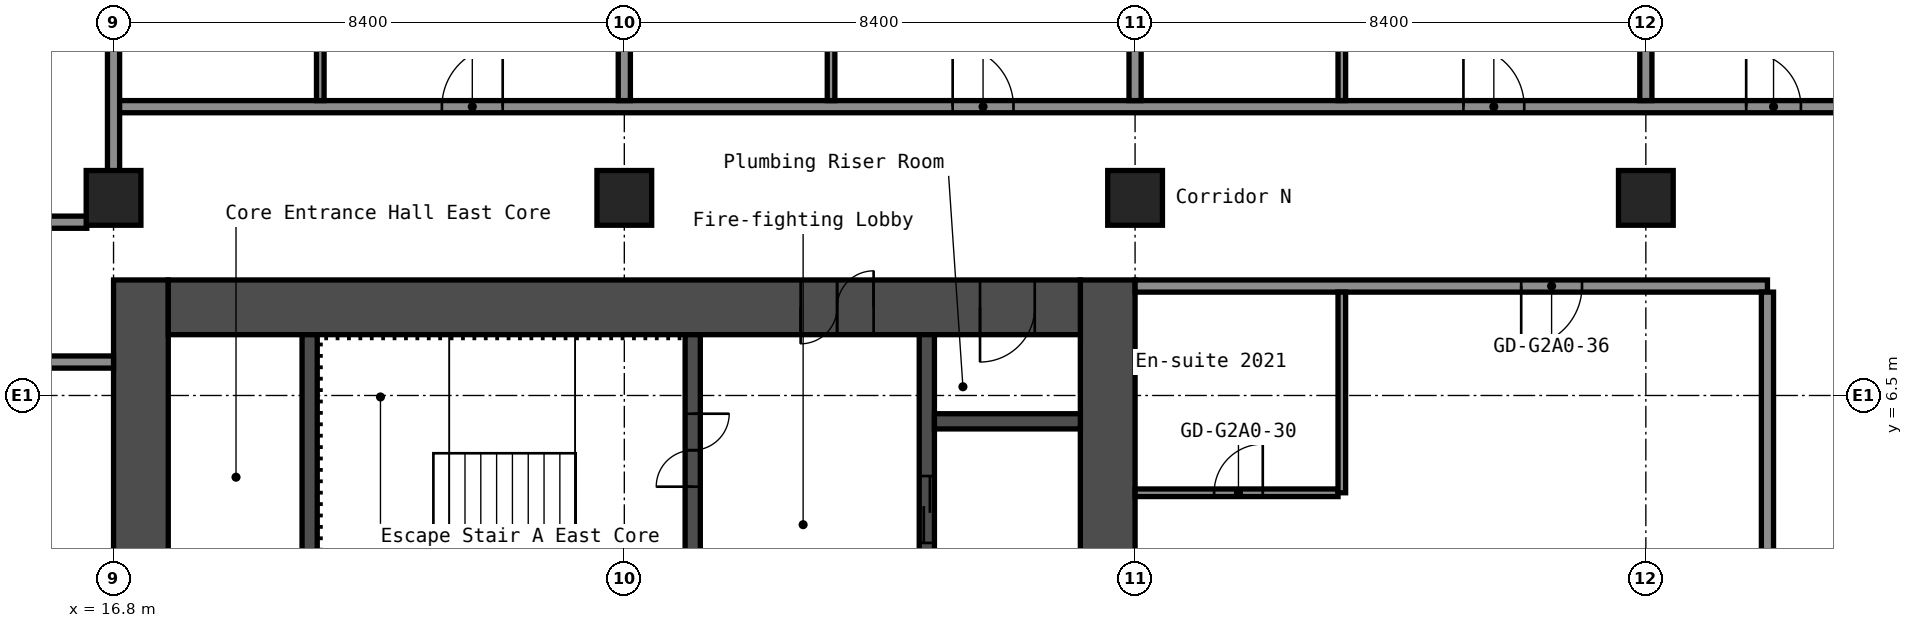
"""IFC4 building model, lengths in metres.
Left out: names, types, materials, properties, quantities, classifications, styles, units other than length and angle.
Written with IfcOpenShell. Run it as: python <this file> out.ifc"""

import sys

from ifc_helpers import new_model, si_unit, direction, frame, frame_2d, origin, origin_2d, place, context, subcontext, project, spatial, rectangle, hollow_rectangle, extrude, element, fill, save


model = new_model("IFC4")
c1 = context("Model", 3, precision=1e-05, world=origin(), true_north=direction((0.0, 1.0)))
c2 = subcontext(c1, "Body", "Model", "MODEL_VIEW")
j1 = project(units=[si_unit("LENGTHUNIT", "METRE"), si_unit("PLANEANGLEUNIT", "RADIAN")], contexts=[c1])
p1 = place(None, origin())
s1 = spatial("IfcSite", under=j1, at=p1, CompositionType="ELEMENT")
p2 = place(p1, origin())
s2 = spatial("IfcBuilding", under=s1, at=p2, CompositionType="ELEMENT")
p3 = place(p2, frame((0.0, 0.0, 75.4)))
s3 = spatial("IfcBuildingStorey", under=s2, at=p3, CompositionType="ELEMENT", Elevation=75.4)
for number, where, z_axis, x_axis in (
    (1, (16.8, 9.75, 0.0), (0.0, 0.0, 1.0), (1.0, 0.0, 0.0)),
    (2, (25.2, 9.75, 0.0), (0.0, 0.0, 1.0), (1.0, 0.0, 0.0)),
    (3, (33.6, 9.75, 0.0), (0.0, 0.0, 1.0), (1.0, 0.0, 0.0)),
    (4, (42.0, 9.75, 0.0), (0.0, 0.0, 1.0), (1.0, 0.0, 0.0)),
):
    element("IfcColumn", number, at=place(p3, frame(where, z_axis=z_axis, x_axis=x_axis)), inside=s3, PredefinedType="COLUMN", context=c2, shape_type="SweptSolid", body=[
        extrude(hollow_rectangle(XDim=0.9, YDim=0.9, WallThickness=0.036, at=origin_2d()), origin(), (0.0, 0.0, 1.0), 2.8),
    ])
p4 = place(p3, frame((17.25, -8.4, 0.0), z_axis=(0.0, 0.0, 1.0), x_axis=(0.0, 1.0, 0.0)))
e5 = element("IfcWall", 5, at=p4, inside=s3, PredefinedType="SHEAR", context=c2, shape_type="SweptSolid", body=[
    extrude(rectangle(XDim=16.8, YDim=0.9, at=frame_2d((8.4, 0.0))), origin(), (0.0, 0.0, 1.0), 2.8),
])
p5 = place(p4, frame((7.6, 0.0, 0.0)))
e6 = element("IfcOpeningElement", 6, at=p5, cuts=e5, PredefinedType="OPENING", context=c2, shape_type="SweptSolid", body=[
    extrude(rectangle(XDim=1.2, YDim=2.1, at=frame_2d((0.6, 1.05))), frame((0.0, 0.46, 0.0), z_axis=(0.0, -1.0, 0.0), x_axis=(1.0, 0.0, 0.0)), (0.0, 0.0, 1.0), 0.92),
])
p6 = place(p3, frame((33.15, -8.4, 0.0), z_axis=(0.0, 0.0, 1.0), x_axis=(0.0, 1.0, 0.0)))
e7 = element("IfcWall", 7, at=p6, inside=s3, PredefinedType="SHEAR", context=c2, shape_type="SweptSolid", body=[
    extrude(rectangle(XDim=16.8, YDim=0.9, at=frame_2d((8.4, 0.0))), origin(), (0.0, 0.0, 1.0), 2.8),
])
p7 = place(p3, frame((17.7, 7.95, 0.0), z_axis=(0.0, 0.0, 1.0), x_axis=(1.0, 0.0, 0.0)))
e8 = element("IfcWall", 8, at=p7, inside=s3, PredefinedType="SHEAR", context=c2, shape_type="SweptSolid", body=[
    extrude(rectangle(XDim=15.0, YDim=0.9, at=frame_2d((7.5, 0.0))), origin(), (0.0, 0.0, 1.0), 2.8),
])
p8 = place(p7, frame((10.4, 0.0, 0.0)))
e9 = element("IfcOpeningElement", 9, at=p8, cuts=e8, PredefinedType="OPENING", context=c2, shape_type="SweptSolid", body=[
    extrude(rectangle(XDim=1.2, YDim=2.1, at=frame_2d((0.6, 1.05))), frame((0.0, 0.46, 0.0), z_axis=(0.0, -1.0, 0.0), x_axis=(1.0, 0.0, 0.0)), (0.0, 0.0, 1.0), 0.92),
])
p9 = place(p7, frame((13.35, 0.0, 0.0)))
e10 = element("IfcOpeningElement", 10, at=p9, cuts=e8, PredefinedType="OPENING", context=c2, shape_type="SweptSolid", body=[
    extrude(rectangle(XDim=0.9, YDim=2.1, at=frame_2d((0.45, 1.05))), frame((0.0, 0.46, 0.0), z_axis=(0.0, -1.0, 0.0), x_axis=(1.0, 0.0, 0.0)), (0.0, 0.0, 1.0), 0.92),
])
p10 = place(p3, frame((20.025, 1.2, 0.0), z_axis=(0.0, 0.0, 1.0), x_axis=(0.0, 1.0, 0.0)))
e11 = element("IfcWall", 11, at=p10, inside=s3, PredefinedType="SHEAR", context=c2, shape_type="SweptSolid", body=[
    extrude(rectangle(XDim=6.3, YDim=0.25, at=frame_2d((3.15, 0.0))), origin(), (0.0, 0.0, 1.0), 2.8),
])
p11 = place(p3, frame((26.325, 3.75, 0.0), z_axis=(0.0, 0.0, 1.0), x_axis=(0.0, 1.0, 0.0)))
e12 = element("IfcWall", 12, at=p11, inside=s3, PredefinedType="SHEAR", context=c2, shape_type="SweptSolid", body=[
    extrude(rectangle(XDim=3.75, YDim=0.25, at=frame_2d((1.875, 0.0))), origin(), (0.0, 0.0, 1.0), 2.8),
])
p12 = place(p11, frame((1.25, 0.0, 0.0)))
e13 = element("IfcOpeningElement", 13, at=p12, cuts=e12, PredefinedType="OPENING", context=c2, shape_type="SweptSolid", body=[
    extrude(rectangle(XDim=1.2, YDim=2.1, at=frame_2d((0.6, 1.05))), frame((0.0, 0.135, 0.0), z_axis=(0.0, -1.0, 0.0), x_axis=(1.0, 0.0, 0.0)), (0.0, 0.0, 1.0), 0.27),
])
p13 = place(p3, frame((30.175, 1.45, 0.0), z_axis=(0.0, 0.0, 1.0), x_axis=(0.0, 1.0, 0.0)))
e14 = element("IfcWall", 14, at=p13, inside=s3, PredefinedType="SHEAR", context=c2, shape_type="SweptSolid", body=[
    extrude(rectangle(XDim=6.05, YDim=0.25, at=frame_2d((3.025, 0.0))), origin(), (0.0, 0.0, 1.0), 2.8),
])
p14 = place(p13, frame((2.625, 0.0, 0.0)))
e15 = element("IfcOpeningElement", 15, at=p14, cuts=e14, PredefinedType="OPENING", context=c2, shape_type="SweptSolid", body=[
    extrude(rectangle(XDim=1.1, YDim=2.1, at=frame_2d((0.55, 1.05))), frame((0.0, 0.135, 0.0), z_axis=(0.0, -1.0, 0.0), x_axis=(1.0, 0.0, 0.0)), (0.0, 0.0, 1.0), 0.27),
])
p15 = place(p3, frame((30.3, 6.075, 0.0), z_axis=(0.0, 0.0, 1.0), x_axis=(1.0, 0.0, 0.0)))
e16 = element("IfcWall", 16, at=p15, inside=s3, PredefinedType="SHEAR", context=c2, shape_type="SweptSolid", body=[
    extrude(rectangle(XDim=2.4, YDim=0.25, at=frame_2d((1.2, 0.0))), origin(), (0.0, 0.0, 1.0), 2.8),
])
p16 = place(p3, frame((33.6, 4.9, 0.0), z_axis=(0.0, 0.0, 1.0), x_axis=(1.0, 0.0, 0.0)))
e17 = element("IfcWall", 17, at=p16, inside=s3, PredefinedType="PARTITIONING", context=c2, shape_type="SweptSolid", body=[
    extrude(rectangle(XDim=3.337, YDim=0.125, at=frame_2d((1.669, 0.0))), origin(), (0.0, 0.0, 1.0), 2.8),
])
p17 = place(p16, frame((1.3, 0.0, 0.0)))
e18 = element("IfcOpeningElement", 18, at=p17, cuts=e17, PredefinedType="OPENING", context=c2, shape_type="SweptSolid", body=[
    extrude(rectangle(XDim=0.8, YDim=2.1, at=frame_2d((0.4, 1.05))), frame((0.0, 0.073, 0.0), z_axis=(0.0, -1.0, 0.0), x_axis=(1.0, 0.0, 0.0)), (0.0, 0.0, 1.0), 0.145),
])
p18 = place(p3, frame((-16.8, 7.05, 0.0), z_axis=(0.0, 0.0, 1.0), x_axis=(1.0, 0.0, 0.0)))
e19 = element("IfcWall", 19, at=p18, inside=s3, PredefinedType="PARTITIONING", context=c2, shape_type="SweptSolid", body=[
    extrude(rectangle(XDim=33.6, YDim=0.2, at=frame_2d((16.8, 0.0))), origin(), (0.0, 0.0, 1.0), 2.8),
])
p19 = place(p18, frame((2.155, 0.0, 0.0)))
e20 = element("IfcOpeningElement", 20, at=p19, cuts=e19, PredefinedType="OPENING", context=c2, shape_type="SweptSolid", body=[
    extrude(rectangle(XDim=0.9, YDim=2.1, at=frame_2d((0.45, 1.05))), frame((0.0, 0.11, 0.0), z_axis=(0.0, -1.0, 0.0), x_axis=(1.0, 0.0, 0.0)), (0.0, 0.0, 1.0), 0.22),
])
p20 = place(p18, frame((6.355, 0.0, 0.0)))
e21 = element("IfcOpeningElement", 21, at=p20, cuts=e19, PredefinedType="OPENING", context=c2, shape_type="SweptSolid", body=[
    extrude(rectangle(XDim=0.9, YDim=2.1, at=frame_2d((0.45, 1.05))), frame((0.0, 0.11, 0.0), z_axis=(0.0, -1.0, 0.0), x_axis=(1.0, 0.0, 0.0)), (0.0, 0.0, 1.0), 0.22),
])
p21 = place(p18, frame((18.28, 0.0, 0.0)))
e22 = element("IfcOpeningElement", 22, at=p21, cuts=e19, PredefinedType="OPENING", context=c2, shape_type="SweptSolid", body=[
    extrude(rectangle(XDim=0.9, YDim=2.1, at=frame_2d((0.45, 1.05))), frame((0.0, 0.11, 0.0), z_axis=(0.0, -1.0, 0.0), x_axis=(1.0, 0.0, 0.0)), (0.0, 0.0, 1.0), 0.22),
])
p22 = place(p18, frame((22.48, 0.0, 0.0)))
e23 = element("IfcOpeningElement", 23, at=p22, cuts=e19, PredefinedType="OPENING", context=c2, shape_type="SweptSolid", body=[
    extrude(rectangle(XDim=0.9, YDim=2.1, at=frame_2d((0.45, 1.05))), frame((0.0, 0.11, 0.0), z_axis=(0.0, -1.0, 0.0), x_axis=(1.0, 0.0, 0.0)), (0.0, 0.0, 1.0), 0.22),
])
p23 = place(p3, frame((33.6, 8.3, 0.0), z_axis=(0.0, 0.0, 1.0), x_axis=(1.0, 0.0, 0.0)))
e24 = element("IfcWall", 24, at=p23, inside=s3, PredefinedType="PARTITIONING", context=c2, shape_type="SweptSolid", body=[
    extrude(rectangle(XDim=10.4, YDim=0.2, at=frame_2d((5.2, 0.0))), origin(), (0.0, 0.0, 1.0), 2.8),
])
p24 = place(p23, frame((6.35, 0.0, 0.0)))
e25 = element("IfcOpeningElement", 25, at=p24, cuts=e24, PredefinedType="OPENING", context=c2, shape_type="SweptSolid", body=[
    extrude(rectangle(XDim=1.0, YDim=2.1, at=frame_2d((0.5, 1.05))), frame((0.0, 0.11, 0.0), z_axis=(0.0, -1.0, 0.0), x_axis=(1.0, 0.0, 0.0)), (0.0, 0.0, 1.0), 0.22),
])
p25 = place(p3, frame((-16.36, 9.35, 0.0), z_axis=(0.0, 0.0, 1.0), x_axis=(1.0, 0.0, 0.0)))
e26 = element("IfcWall", 26, at=p25, inside=s3, PredefinedType="PARTITIONING", context=c2, shape_type="SweptSolid", body=[
    extrude(rectangle(XDim=32.72, YDim=0.2, at=frame_2d((16.36, 0.0))), origin(), (0.0, 0.0, 1.0), 2.8),
])
p26 = place(p25, frame((1.545, 0.0, 0.0)))
e27 = element("IfcOpeningElement", 27, at=p26, cuts=e26, PredefinedType="OPENING", context=c2, shape_type="SweptSolid", body=[
    extrude(rectangle(XDim=0.9, YDim=2.1, at=frame_2d((0.45, 1.05))), frame((0.0, 0.11, 0.0), z_axis=(0.0, -1.0, 0.0), x_axis=(1.0, 0.0, 0.0)), (0.0, 0.0, 1.0), 0.22),
])
p27 = place(p25, frame((5.745, 0.0, 0.0)))
e28 = element("IfcOpeningElement", 28, at=p27, cuts=e26, PredefinedType="OPENING", context=c2, shape_type="SweptSolid", body=[
    extrude(rectangle(XDim=0.9, YDim=2.1, at=frame_2d((0.45, 1.05))), frame((0.0, 0.11, 0.0), z_axis=(0.0, -1.0, 0.0), x_axis=(1.0, 0.0, 0.0)), (0.0, 0.0, 1.0), 0.22),
])
p28 = place(p25, frame((9.275, 0.0, 0.0)))
e29 = element("IfcOpeningElement", 29, at=p28, cuts=e26, PredefinedType="OPENING", context=c2, shape_type="SweptSolid", body=[
    extrude(rectangle(XDim=0.9, YDim=2.1, at=frame_2d((0.45, 1.05))), frame((0.0, 0.11, 0.0), z_axis=(0.0, -1.0, 0.0), x_axis=(1.0, 0.0, 0.0)), (0.0, 0.0, 1.0), 0.22),
])
p29 = place(p25, frame((13.475, 0.0, 0.0)))
e30 = element("IfcOpeningElement", 30, at=p29, cuts=e26, PredefinedType="OPENING", context=c2, shape_type="SweptSolid", body=[
    extrude(rectangle(XDim=0.9, YDim=2.1, at=frame_2d((0.45, 1.05))), frame((0.0, 0.11, 0.0), z_axis=(0.0, -1.0, 0.0), x_axis=(1.0, 0.0, 0.0)), (0.0, 0.0, 1.0), 0.22),
])
p30 = place(p25, frame((17.76, 0.0, 0.0)))
e31 = element("IfcOpeningElement", 31, at=p30, cuts=e26, PredefinedType="OPENING", context=c2, shape_type="SweptSolid", body=[
    extrude(rectangle(XDim=0.9, YDim=2.1, at=frame_2d((0.45, 1.05))), frame((0.0, 0.11, 0.0), z_axis=(0.0, -1.0, 0.0), x_axis=(1.0, 0.0, 0.0)), (0.0, 0.0, 1.0), 0.22),
])
p31 = place(p25, frame((21.96, 0.0, 0.0)))
e32 = element("IfcOpeningElement", 32, at=p31, cuts=e26, PredefinedType="OPENING", context=c2, shape_type="SweptSolid", body=[
    extrude(rectangle(XDim=0.9, YDim=2.1, at=frame_2d((0.45, 1.05))), frame((0.0, 0.11, 0.0), z_axis=(0.0, -1.0, 0.0), x_axis=(1.0, 0.0, 0.0)), (0.0, 0.0, 1.0), 0.22),
])
p32 = place(p25, frame((28.46, 0.0, 0.0)))
e33 = element("IfcOpeningElement", 33, at=p32, cuts=e26, PredefinedType="OPENING", context=c2, shape_type="SweptSolid", body=[
    extrude(rectangle(XDim=1.0, YDim=2.1, at=frame_2d((0.5, 1.05))), frame((0.0, 0.11, 0.0), z_axis=(0.0, -1.0, 0.0), x_axis=(1.0, 0.0, 0.0)), (0.0, 0.0, 1.0), 0.22),
])
p33 = place(p3, frame((16.8, 11.25, 0.0), z_axis=(0.0, 0.0, 1.0), x_axis=(1.0, 0.0, 0.0)))
e34 = element("IfcWall", 34, at=p33, inside=s3, PredefinedType="PARTITIONING", context=c2, shape_type="SweptSolid", body=[
    extrude(rectangle(XDim=29.7, YDim=0.2, at=frame_2d((14.85, 0.0))), origin(), (0.0, 0.0, 1.0), 2.8),
])
p34 = place(p33, frame((5.4, 0.0, 0.0)))
e35 = element("IfcOpeningElement", 35, at=p34, cuts=e34, PredefinedType="OPENING", context=c2, shape_type="SweptSolid", body=[
    extrude(rectangle(XDim=1.0, YDim=2.1, at=frame_2d((0.5, 1.05))), frame((0.0, 0.11, 0.0), z_axis=(0.0, -1.0, 0.0), x_axis=(1.0, 0.0, 0.0)), (0.0, 0.0, 1.0), 0.22),
])
p35 = place(p33, frame((13.8, 0.0, 0.0)))
e36 = element("IfcOpeningElement", 36, at=p35, cuts=e34, PredefinedType="OPENING", context=c2, shape_type="SweptSolid", body=[
    extrude(rectangle(XDim=1.0, YDim=2.1, at=frame_2d((0.5, 1.05))), frame((0.0, 0.11, 0.0), z_axis=(0.0, -1.0, 0.0), x_axis=(1.0, 0.0, 0.0)), (0.0, 0.0, 1.0), 0.22),
])
p36 = place(p33, frame((22.2, 0.0, 0.0)))
e37 = element("IfcOpeningElement", 37, at=p36, cuts=e34, PredefinedType="OPENING", context=c2, shape_type="SweptSolid", body=[
    extrude(rectangle(XDim=1.0, YDim=2.1, at=frame_2d((0.5, 1.05))), frame((0.0, 0.11, 0.0), z_axis=(0.0, -1.0, 0.0), x_axis=(1.0, 0.0, 0.0)), (0.0, 0.0, 1.0), 0.22),
])
p37 = place(p33, frame((26.85, 0.0, 0.0)))
e38 = element("IfcOpeningElement", 38, at=p37, cuts=e34, PredefinedType="OPENING", context=c2, shape_type="SweptSolid", body=[
    extrude(rectangle(XDim=0.9, YDim=2.1, at=frame_2d((0.45, 1.05))), frame((0.0, 0.11, 0.0), z_axis=(0.0, -1.0, 0.0), x_axis=(1.0, 0.0, 0.0)), (0.0, 0.0, 1.0), 0.22),
])
p38 = place(p3, frame((16.8, 10.19, 0.0), z_axis=(0.0, 0.0, 1.0), x_axis=(0.0, 1.0, 0.0)))
e39 = element("IfcWall", 39, at=p38, inside=s3, PredefinedType="PARTITIONING", context=c2, shape_type="SweptSolid", body=[
    extrude(rectangle(XDim=13.36, YDim=0.2, at=frame_2d((6.68, 0.0))), origin(), (0.0, 0.0, 1.0), 2.8),
])
p39 = place(p3, frame((20.2, 11.35, 0.0), z_axis=(0.0, 0.0, 1.0), x_axis=(0.0, 1.0, 0.0)))
e40 = element("IfcWall", 40, at=p39, inside=s3, PredefinedType="PARTITIONING", context=c2, shape_type="SweptSolid", body=[
    extrude(rectangle(XDim=3.3, YDim=0.125, at=frame_2d((1.65, 0.0))), origin(), (0.0, 0.0, 1.0), 2.8),
])
p40 = place(p3, frame((25.2, 11.35, 0.0), z_axis=(0.0, 0.0, 1.0), x_axis=(0.0, 1.0, 0.0)))
e41 = element("IfcWall", 41, at=p40, inside=s3, PredefinedType="PARTITIONING", context=c2, shape_type="SweptSolid", body=[
    extrude(rectangle(XDim=12.2, YDim=0.2, at=frame_2d((6.1, 0.0))), origin(), (0.0, 0.0, 1.0), 2.8),
])
p41 = place(p3, frame((28.6, 11.35, 0.0), z_axis=(0.0, 0.0, 1.0), x_axis=(0.0, 1.0, 0.0)))
e42 = element("IfcWall", 42, at=p41, inside=s3, PredefinedType="PARTITIONING", context=c2, shape_type="SweptSolid", body=[
    extrude(rectangle(XDim=3.3, YDim=0.125, at=frame_2d((1.65, 0.0))), origin(), (0.0, 0.0, 1.0), 2.8),
])
p42 = place(p3, frame((33.6, 11.35, 0.0), z_axis=(0.0, 0.0, 1.0), x_axis=(0.0, 1.0, 0.0)))
e43 = element("IfcWall", 43, at=p42, inside=s3, PredefinedType="PARTITIONING", context=c2, shape_type="SweptSolid", body=[
    extrude(rectangle(XDim=12.2, YDim=0.2, at=frame_2d((6.1, 0.0))), origin(), (0.0, 0.0, 1.0), 2.8),
])
p43 = place(p3, frame((37.0, 4.9, 0.0), z_axis=(0.0, 0.0, 1.0), x_axis=(0.0, 1.0, 0.0)))
e44 = element("IfcWall", 44, at=p43, inside=s3, PredefinedType="PARTITIONING", context=c2, shape_type="SweptSolid", body=[
    extrude(rectangle(XDim=3.3, YDim=0.125, at=frame_2d((1.65, 0.0))), origin(), (0.0, 0.0, 1.0), 2.8),
])
p44 = place(p3, frame((37.0, 11.35, 0.0), z_axis=(0.0, 0.0, 1.0), x_axis=(0.0, 1.0, 0.0)))
e45 = element("IfcWall", 45, at=p44, inside=s3, PredefinedType="PARTITIONING", context=c2, shape_type="SweptSolid", body=[
    extrude(rectangle(XDim=3.3, YDim=0.125, at=frame_2d((1.65, 0.0))), origin(), (0.0, 0.0, 1.0), 2.8),
])
p45 = place(p3, frame((42.0, 11.35, 0.0), z_axis=(0.0, 0.0, 1.0), x_axis=(0.0, 1.0, 0.0)))
e46 = element("IfcWall", 46, at=p45, inside=s3, PredefinedType="PARTITIONING", context=c2, shape_type="SweptSolid", body=[
    extrude(rectangle(XDim=12.2, YDim=0.2, at=frame_2d((6.1, 0.0))), origin(), (0.0, 0.0, 1.0), 2.8),
])
p46 = place(p3, frame((44.0, -8.2, 0.0), z_axis=(0.0, 0.0, 1.0), x_axis=(0.0, 1.0, 0.0)))
e47 = element("IfcWall", 47, at=p46, inside=s3, PredefinedType="PARTITIONING", context=c2, shape_type="SweptSolid", body=[
    extrude(rectangle(XDim=16.4, YDim=0.2, at=frame_2d((8.2, 0.0))), origin(), (0.0, 0.0, 1.0), 2.8),
])
p47 = place(p8, origin())
e48 = element("IfcDoor", 48, at=p47, inside=s3, OperationType="DOUBLE_DOOR_SINGLE_SWING", PredefinedType="DOOR", context=c2, shape_type="SweptSolid", body=[
    extrude(rectangle(XDim=1.2, YDim=2.1, at=frame_2d((0.6, 1.05))), frame((0.0, 0.025, 0.0), z_axis=(0.0, -1.0, 0.0), x_axis=(1.0, 0.0, 0.0)), (0.0, 0.0, 1.0), 0.05),
])
fill(e9, e48)
p48 = place(p9, origin())
e49 = element("IfcDoor", 49, at=p48, inside=s3, OperationType="SINGLE_SWING_LEFT", PredefinedType="DOOR", context=c2, shape_type="SweptSolid", body=[
    extrude(rectangle(XDim=0.9, YDim=2.1, at=frame_2d((0.45, 1.05))), frame((0.0, 0.025, 0.0), z_axis=(0.0, -1.0, 0.0), x_axis=(1.0, 0.0, 0.0)), (0.0, 0.0, 1.0), 0.05),
])
fill(e10, e49)
p49 = place(p12, origin())
e50 = element("IfcDoor", 50, at=p49, inside=s3, OperationType="DOUBLE_DOOR_SINGLE_SWING", PredefinedType="DOOR", context=c2, shape_type="SweptSolid", body=[
    extrude(rectangle(XDim=1.2, YDim=2.1, at=frame_2d((0.6, 1.05))), frame((0.0, 0.025, 0.0), z_axis=(0.0, -1.0, 0.0), x_axis=(1.0, 0.0, 0.0)), (0.0, 0.0, 1.0), 0.05),
])
fill(e13, e50)
p50 = place(p14, origin())
e51 = element("IfcDoor", 51, at=p50, inside=s3, OperationType="DOUBLE_DOOR_SLIDING", PredefinedType="DOOR", context=c2, shape_type="SweptSolid", body=[
    extrude(rectangle(XDim=1.1, YDim=2.1, at=frame_2d((0.55, 1.05))), frame((0.0, 0.025, 0.0), z_axis=(0.0, -1.0, 0.0), x_axis=(1.0, 0.0, 0.0)), (0.0, 0.0, 1.0), 0.05),
])
fill(e15, e51)
p51 = place(p17, origin())
e52 = element("IfcDoor", 52, at=p51, inside=s3, OperationType="SINGLE_SWING_LEFT", PredefinedType="DOOR", context=c2, shape_type="SweptSolid", body=[
    extrude(rectangle(XDim=0.8, YDim=2.1, at=frame_2d((0.4, 1.05))), frame((0.0, 0.025, 0.0), z_axis=(0.0, -1.0, 0.0), x_axis=(1.0, 0.0, 0.0)), (0.0, 0.0, 1.0), 0.05),
])
fill(e18, e52)
p52 = place(p24, origin())
e53 = element("IfcDoor", 53, at=p52, inside=s3, OperationType="SINGLE_SWING_LEFT", PredefinedType="DOOR", context=c2, shape_type="SweptSolid", body=[
    extrude(rectangle(XDim=1.0, YDim=2.1, at=frame_2d((0.5, 1.05))), frame((0.0, 0.025, 0.0), z_axis=(0.0, -1.0, 0.0), x_axis=(1.0, 0.0, 0.0)), (0.0, 0.0, 1.0), 0.05),
])
fill(e25, e53)
p53 = place(p34, origin())
e54 = element("IfcDoor", 54, at=p53, inside=s3, OperationType="SINGLE_SWING_LEFT", PredefinedType="DOOR", context=c2, shape_type="SweptSolid", body=[
    extrude(rectangle(XDim=1.0, YDim=2.1, at=frame_2d((0.5, 1.05))), frame((0.0, 0.025, 0.0), z_axis=(0.0, -1.0, 0.0), x_axis=(1.0, 0.0, 0.0)), (0.0, 0.0, 1.0), 0.05),
])
fill(e35, e54)
p54 = place(p35, origin())
e55 = element("IfcDoor", 55, at=p54, inside=s3, OperationType="SINGLE_SWING_RIGHT", PredefinedType="DOOR", context=c2, shape_type="SweptSolid", body=[
    extrude(rectangle(XDim=1.0, YDim=2.1, at=frame_2d((0.5, 1.05))), frame((0.0, 0.025, 0.0), z_axis=(0.0, -1.0, 0.0), x_axis=(1.0, 0.0, 0.0)), (0.0, 0.0, 1.0), 0.05),
])
fill(e36, e55)
p55 = place(p36, origin())
e56 = element("IfcDoor", 56, at=p55, inside=s3, OperationType="SINGLE_SWING_RIGHT", PredefinedType="DOOR", context=c2, shape_type="SweptSolid", body=[
    extrude(rectangle(XDim=1.0, YDim=2.1, at=frame_2d((0.5, 1.05))), frame((0.0, 0.025, 0.0), z_axis=(0.0, -1.0, 0.0), x_axis=(1.0, 0.0, 0.0)), (0.0, 0.0, 1.0), 0.05),
])
fill(e37, e56)
p56 = place(p37, origin())
e57 = element("IfcDoor", 57, at=p56, inside=s3, OperationType="SINGLE_SWING_RIGHT", PredefinedType="DOOR", context=c2, shape_type="SweptSolid", body=[
    extrude(rectangle(XDim=0.9, YDim=2.1, at=frame_2d((0.45, 1.05))), frame((0.0, 0.025, 0.0), z_axis=(0.0, -1.0, 0.0), x_axis=(1.0, 0.0, 0.0)), (0.0, 0.0, 1.0), 0.05),
])
fill(e38, e57)
save(model, sys.argv[1])
